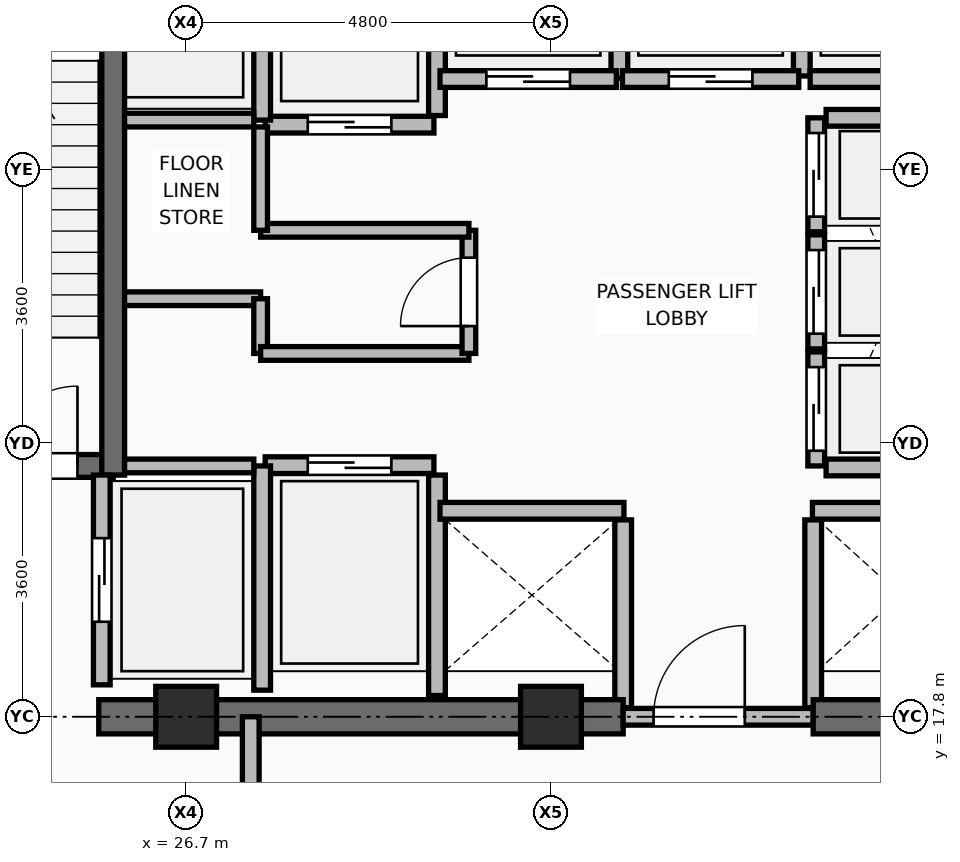
"""IFC4 building model, lengths in metres.
Left out: names, types, materials, properties, quantities, classifications, styles, units other than length and angle.
Written with IfcOpenShell. Run it as: python <this file> out.ifc"""

import sys

from ifc_helpers import new_model, si_unit, direction, frame, frame_2d, origin, origin_2d, place, context, subcontext, project, spatial, rectangle, extrude, element, fill, save


model = new_model("IFC4")
c1 = context("Model", 3, precision=1e-05, world=origin(), true_north=direction((0.0, 1.0)))
c2 = subcontext(c1, "Body", "Model", "MODEL_VIEW")
j1 = project(units=[si_unit("LENGTHUNIT", "METRE"), si_unit("PLANEANGLEUNIT", "RADIAN")], contexts=[c1])
p1 = place(None, origin())
s1 = spatial("IfcSite", under=j1, at=p1, CompositionType="ELEMENT")
p2 = place(p1, origin())
s2 = spatial("IfcBuilding", under=s1, at=p2, CompositionType="ELEMENT")
p3 = place(p2, frame((0.0, 0.0, 181.35)))
s3 = spatial("IfcBuildingStorey", under=s2, at=p3, CompositionType="ELEMENT", Elevation=181.35)
for number, where, z_axis, x_axis in (
    (1, (26.7, 17.8, 0.0), (0.0, 0.0, 1.0), (1.0, 0.0, 0.0)),
    (2, (31.5, 17.8, 0.0), (0.0, 0.0, 1.0), (1.0, 0.0, 0.0)),
):
    element("IfcColumn", number, at=place(p3, frame(where, z_axis=z_axis, x_axis=x_axis)), inside=s3, PredefinedType="COLUMN", context=c2, shape_type="SweptSolid", body=[
        extrude(rectangle(XDim=0.8, YDim=0.8, at=origin_2d()), origin(), (0.0, 0.0, 1.0), 4.8),
    ])
p4 = place(p3, frame((30.0, 18.08, 0.0), z_axis=(0.0, 0.0, 1.0), x_axis=(0.0, 1.0, 0.0)))
e3 = element("IfcWall", 3, at=p4, inside=s3, PredefinedType="PARTITIONING", context=c2, shape_type="SweptSolid", body=[
    extrude(rectangle(XDim=2.9, YDim=0.22, at=frame_2d((1.45, 0.0))), origin(), (0.0, 0.0, 1.0), 4.595),
])
for number, where, z_axis, x_axis in (
    (4, (32.45, 17.92, 0.0), (0.0, 0.0, 1.0), (0.0, 1.0, 0.0)),
    (5, (34.95, 17.92, 0.0), (0.0, 0.0, 1.0), (0.0, 1.0, 0.0)),
):
    element("IfcWall", number, at=place(p3, frame(where, z_axis=z_axis, x_axis=x_axis)), inside=s3, PredefinedType="PARTITIONING", context=c2, shape_type="SweptSolid", body=[
        extrude(rectangle(XDim=2.47, YDim=0.22, at=frame_2d((1.235, 0.0))), origin(), (0.0, 0.0, 1.0), 4.595),
    ])
p5 = place(p3, frame((30.0, 25.71, 0.0), z_axis=(0.0, 0.0, 1.0), x_axis=(0.0, 1.0, 0.0)))
e6 = element("IfcWall", 6, at=p5, inside=s3, PredefinedType="PARTITIONING", context=c2, shape_type="SweptSolid", body=[
    extrude(rectangle(XDim=2.73, YDim=0.22, at=frame_2d((1.365, 0.0))), origin(), (0.0, 0.0, 1.0), 4.595),
])
p6 = place(p3, frame((32.4, 26.2, 0.0), z_axis=(0.0, 0.0, 1.0), x_axis=(0.0, 1.0, 0.0)))
e7 = element("IfcWall", 7, at=p6, inside=s3, PredefinedType="PARTITIONING", context=c2, shape_type="SweptSolid", body=[
    extrude(rectangle(XDim=2.24, YDim=0.22, at=frame_2d((1.12, 0.0))), origin(), (0.0, 0.0, 1.0), 4.595),
])
p7 = place(p3, frame((34.8, 26.23, 0.0), z_axis=(0.0, 0.0, 1.0), x_axis=(0.0, 1.0, 0.0)))
e8 = element("IfcWall", 8, at=p7, inside=s3, PredefinedType="PARTITIONING", context=c2, shape_type="SweptSolid", body=[
    extrude(rectangle(XDim=2.21, YDim=0.22, at=frame_2d((1.105, 0.0))), origin(), (0.0, 0.0, 1.0), 4.595),
])
p8 = place(p3, frame((34.91, 26.19, 0.0), z_axis=(0.0, 0.0, 1.0), x_axis=(1.0, 0.0, 0.0)))
e9 = element("IfcWall", 9, at=p8, inside=s3, PredefinedType="PARTITIONING", context=c2, shape_type="SweptSolid", body=[
    extrude(rectangle(XDim=2.14, YDim=0.22, at=frame_2d((1.07, 0.0))), origin(), (0.0, 0.0, 1.0), 4.595),
])
p9 = place(p3, frame((25.55, 17.8, 0.0), z_axis=(0.0, 0.0, 1.0), x_axis=(1.0, 0.0, 0.0)))
e10 = element("IfcWall", 10, at=p9, inside=s3, PredefinedType="SHEAR", context=c2, shape_type="SweptSolid", body=[
    extrude(rectangle(XDim=6.9, YDim=0.45, at=frame_2d((3.45, 0.0))), origin(), (0.0, 0.0, 1.0), 4.62),
])
p10 = place(p3, frame((32.45, 17.8, 0.0), z_axis=(0.0, 0.0, 1.0), x_axis=(1.0, 0.0, 0.0)))
e11 = element("IfcWall", 11, at=p10, inside=s3, PredefinedType="PARTITIONING", context=c2, shape_type="SweptSolid", body=[
    extrude(rectangle(XDim=2.5, YDim=0.22, at=frame_2d((1.25, 0.0))), origin(), (0.0, 0.0, 1.0), 4.131),
])
p11 = place(p10, frame((0.4, 0.0, 0.0)))
e12 = element("IfcOpeningElement", 12, at=p11, cuts=e11, PredefinedType="OPENING", context=c2, shape_type="SweptSolid", body=[
    extrude(rectangle(XDim=1.2, YDim=2.1, at=frame_2d((0.6, 1.05))), frame((0.0, 0.12, 0.0), z_axis=(0.0, -1.0, 0.0), x_axis=(1.0, 0.0, 0.0)), (0.0, 0.0, 1.0), 0.24),
])
p12 = place(p3, frame((34.95, 17.8, 0.0), z_axis=(0.0, 0.0, 1.0), x_axis=(1.0, 0.0, 0.0)))
e13 = element("IfcWall", 13, at=p12, inside=s3, PredefinedType="SHEAR", context=c2, shape_type="SweptSolid", body=[
    extrude(rectangle(XDim=6.375, YDim=0.45, at=frame_2d((3.188, 0.0))), origin(), (0.0, 0.0, 1.0), 4.62),
])
p13 = place(p3, frame((22.125, 21.1, 0.0), z_axis=(0.0, 0.0, 1.0), x_axis=(1.0, 0.0, 0.0)))
e14 = element("IfcWall", 14, at=p13, inside=s3, PredefinedType="SHEAR", context=c2, shape_type="SweptSolid", body=[
    extrude(rectangle(XDim=3.615, YDim=0.3, at=frame_2d((1.808, 0.0))), origin(), (0.0, 0.0, 1.0), 4.62),
])
p14 = place(p13, frame((2.095, 0.0, 0.0)))
e15 = element("IfcOpeningElement", 15, at=p14, cuts=e14, PredefinedType="OPENING", context=c2, shape_type="SweptSolid", body=[
    extrude(rectangle(XDim=1.05, YDim=2.1, at=frame_2d((0.525, 1.05))), frame((0.0, 0.16, 0.0), z_axis=(0.0, -1.0, 0.0), x_axis=(1.0, 0.0, 0.0)), (0.0, 0.0, 1.0), 0.32),
])
p15 = place(p3, frame((25.74, 20.98, 0.0), z_axis=(0.0, 0.0, 1.0), x_axis=(0.0, 1.0, 0.0)))
e16 = element("IfcWall", 16, at=p15, inside=s3, PredefinedType="SHEAR", context=c2, shape_type="SweptSolid", body=[
    extrude(rectangle(XDim=7.99, YDim=0.3, at=frame_2d((3.995, 0.0))), origin(), (0.0, 0.0, 1.0), 4.62),
])
p16 = place(p3, frame((25.59, 18.22, 0.0), z_axis=(0.0, 0.0, 1.0), x_axis=(0.0, 1.0, 0.0)))
e17 = element("IfcWall", 17, at=p16, inside=s3, PredefinedType="PARTITIONING", context=c2, shape_type="SweptSolid", body=[
    extrude(rectangle(XDim=2.76, YDim=0.22, at=frame_2d((1.38, 0.0))), origin(), (0.0, 0.0, 1.0), 4.6),
])
p17 = place(p16, frame((0.83, 0.0, 0.0)))
e18 = element("IfcOpeningElement", 18, at=p17, cuts=e17, PredefinedType="OPENING", context=c2, shape_type="SweptSolid", body=[
    extrude(rectangle(XDim=1.1, YDim=2.2, at=frame_2d((0.55, 1.1))), frame((0.0, 0.12, 0.0), z_axis=(0.0, -1.0, 0.0), x_axis=(1.0, 0.0, 0.0)), (0.0, 0.0, 1.0), 0.24),
])
p18 = place(p3, frame((27.74, 21.11, 0.0), z_axis=(0.0, 0.0, 1.0), x_axis=(1.0, 0.0, 0.0)))
e19 = element("IfcWall", 19, at=p18, inside=s3, PredefinedType="PARTITIONING", context=c2, shape_type="SweptSolid", body=[
    extrude(rectangle(XDim=2.22, YDim=0.22, at=frame_2d((1.11, 0.0))), origin(), (0.0, 0.0, 1.0), 4.6),
])
p19 = place(p18, frame((0.56, 0.0, 0.0)))
e20 = element("IfcOpeningElement", 20, at=p19, cuts=e19, PredefinedType="OPENING", context=c2, shape_type="SweptSolid", body=[
    extrude(rectangle(XDim=1.1, YDim=2.2, at=frame_2d((0.55, 1.1))), frame((0.0, 0.12, 0.0), z_axis=(0.0, -1.0, 0.0), x_axis=(1.0, 0.0, 0.0)), (0.0, 0.0, 1.0), 0.24),
])
p20 = place(p3, frame((27.74, 25.59, 0.0), z_axis=(0.0, 0.0, 1.0), x_axis=(1.0, 0.0, 0.0)))
e21 = element("IfcWall", 21, at=p20, inside=s3, PredefinedType="PARTITIONING", context=c2, shape_type="SweptSolid", body=[
    extrude(rectangle(XDim=2.22, YDim=0.22, at=frame_2d((1.11, 0.0))), origin(), (0.0, 0.0, 1.0), 4.6),
])
p21 = place(p20, frame((0.56, 0.0, 0.0)))
e22 = element("IfcOpeningElement", 22, at=p21, cuts=e21, PredefinedType="OPENING", context=c2, shape_type="SweptSolid", body=[
    extrude(rectangle(XDim=1.1, YDim=2.2, at=frame_2d((0.55, 1.1))), frame((0.0, 0.12, 0.0), z_axis=(0.0, -1.0, 0.0), x_axis=(1.0, 0.0, 0.0)), (0.0, 0.0, 1.0), 0.24),
])
p22 = place(p3, frame((30.04, 20.51, 0.0), z_axis=(0.0, 0.0, 1.0), x_axis=(1.0, 0.0, 0.0)))
e23 = element("IfcWall", 23, at=p22, inside=s3, PredefinedType="PARTITIONING", context=c2, shape_type="SweptSolid", body=[
    extrude(rectangle(XDim=2.42, YDim=0.22, at=frame_2d((1.21, 0.0))), origin(), (0.0, 0.0, 1.0), 4.6),
])
p23 = place(p3, frame((34.94, 20.51, 0.0), z_axis=(0.0, 0.0, 1.0), x_axis=(1.0, 0.0, 0.0)))
e24 = element("IfcWall", 24, at=p23, inside=s3, PredefinedType="PARTITIONING", context=c2, shape_type="SweptSolid", body=[
    extrude(rectangle(XDim=2.24, YDim=0.22, at=frame_2d((1.12, 0.0))), origin(), (0.0, 0.0, 1.0), 4.6),
])
p24 = place(p3, frame((30.04, 26.19, 0.0), z_axis=(0.0, 0.0, 1.0), x_axis=(1.0, 0.0, 0.0)))
e25 = element("IfcWall", 25, at=p24, inside=s3, PredefinedType="PARTITIONING", context=c2, shape_type="SweptSolid", body=[
    extrude(rectangle(XDim=2.32, YDim=0.22, at=frame_2d((1.16, 0.0))), origin(), (0.0, 0.0, 1.0), 4.6),
])
p25 = place(p24, frame((0.61, 0.0, 0.0)))
e26 = element("IfcOpeningElement", 26, at=p25, cuts=e25, PredefinedType="OPENING", context=c2, shape_type="SweptSolid", body=[
    extrude(rectangle(XDim=1.1, YDim=2.2, at=frame_2d((0.55, 1.1))), frame((0.0, 0.12, 0.0), z_axis=(0.0, -1.0, 0.0), x_axis=(1.0, 0.0, 0.0)), (0.0, 0.0, 1.0), 0.24),
])
p26 = place(p3, frame((32.44, 26.19, 0.0), z_axis=(0.0, 0.0, 1.0), x_axis=(1.0, 0.0, 0.0)))
e27 = element("IfcWall", 27, at=p26, inside=s3, PredefinedType="PARTITIONING", context=c2, shape_type="SweptSolid", body=[
    extrude(rectangle(XDim=2.32, YDim=0.22, at=frame_2d((1.16, 0.0))), origin(), (0.0, 0.0, 1.0), 4.6),
])
p27 = place(p26, frame((0.61, 0.0, 0.0)))
e28 = element("IfcOpeningElement", 28, at=p27, cuts=e27, PredefinedType="OPENING", context=c2, shape_type="SweptSolid", body=[
    extrude(rectangle(XDim=1.1, YDim=2.2, at=frame_2d((0.55, 1.1))), frame((0.0, 0.12, 0.0), z_axis=(0.0, -1.0, 0.0), x_axis=(1.0, 0.0, 0.0)), (0.0, 0.0, 1.0), 0.24),
])
p28 = place(p3, frame((34.99, 21.1, 0.0), z_axis=(0.0, 0.0, 1.0), x_axis=(0.0, 1.0, 0.0)))
e29 = element("IfcWall", 29, at=p28, inside=s3, PredefinedType="PARTITIONING", context=c2, shape_type="SweptSolid", body=[
    extrude(rectangle(XDim=1.5, YDim=0.22, at=frame_2d((0.75, 0.0))), origin(), (0.0, 0.0, 1.0), 4.6),
])
p29 = place(p28, frame((0.2, 0.0, 0.0)))
e30 = element("IfcOpeningElement", 30, at=p29, cuts=e29, PredefinedType="OPENING", context=c2, shape_type="SweptSolid", body=[
    extrude(rectangle(XDim=1.1, YDim=2.2, at=frame_2d((0.55, 1.1))), frame((0.0, 0.12, 0.0), z_axis=(0.0, -1.0, 0.0), x_axis=(1.0, 0.0, 0.0)), (0.0, 0.0, 1.0), 0.24),
])
p30 = place(p3, frame((34.99, 22.64, 0.0), z_axis=(0.0, 0.0, 1.0), x_axis=(0.0, 1.0, 0.0)))
e31 = element("IfcWall", 31, at=p30, inside=s3, PredefinedType="PARTITIONING", context=c2, shape_type="SweptSolid", body=[
    extrude(rectangle(XDim=1.5, YDim=0.22, at=frame_2d((0.75, 0.0))), origin(), (0.0, 0.0, 1.0), 4.6),
])
p31 = place(p30, frame((0.2, 0.0, 0.0)))
e32 = element("IfcOpeningElement", 32, at=p31, cuts=e31, PredefinedType="OPENING", context=c2, shape_type="SweptSolid", body=[
    extrude(rectangle(XDim=1.1, YDim=2.2, at=frame_2d((0.55, 1.1))), frame((0.0, 0.12, 0.0), z_axis=(0.0, -1.0, 0.0), x_axis=(1.0, 0.0, 0.0)), (0.0, 0.0, 1.0), 0.24),
])
p32 = place(p3, frame((34.99, 24.18, 0.0), z_axis=(0.0, 0.0, 1.0), x_axis=(0.0, 1.0, 0.0)))
e33 = element("IfcWall", 33, at=p32, inside=s3, PredefinedType="PARTITIONING", context=c2, shape_type="SweptSolid", body=[
    extrude(rectangle(XDim=1.5, YDim=0.22, at=frame_2d((0.75, 0.0))), origin(), (0.0, 0.0, 1.0), 4.6),
])
p33 = place(p32, frame((0.2, 0.0, 0.0)))
e34 = element("IfcOpeningElement", 34, at=p33, cuts=e33, PredefinedType="OPENING", context=c2, shape_type="SweptSolid", body=[
    extrude(rectangle(XDim=1.1, YDim=2.2, at=frame_2d((0.55, 1.1))), frame((0.0, 0.12, 0.0), z_axis=(0.0, -1.0, 0.0), x_axis=(1.0, 0.0, 0.0)), (0.0, 0.0, 1.0), 0.24),
])
p34 = place(p3, frame((27.7, 18.15, 0.0), z_axis=(0.0, 0.0, 1.0), x_axis=(0.0, 1.0, 0.0)))
e35 = element("IfcWall", 35, at=p34, inside=s3, PredefinedType="PARTITIONING", context=c2, shape_type="SweptSolid", body=[
    extrude(rectangle(XDim=2.95, YDim=0.22, at=frame_2d((1.475, 0.0))), origin(), (0.0, 0.0, 1.0), 4.6),
])
p35 = place(p3, frame((27.7, 25.65, 0.0), z_axis=(0.0, 0.0, 1.0), x_axis=(0.0, 1.0, 0.0)))
e36 = element("IfcWall", 36, at=p35, inside=s3, PredefinedType="PARTITIONING", context=c2, shape_type="SweptSolid", body=[
    extrude(rectangle(XDim=3.0, YDim=0.22, at=frame_2d((1.5, 0.0))), origin(), (0.0, 0.0, 1.0), 4.6),
])
for number, where, z_axis, x_axis in (
    (37, (35.12, 21.08, 0.0), (0.0, 0.0, 1.0), (1.0, 0.0, 0.0)),
    (38, (35.12, 25.68, 0.0), (0.0, 0.0, 1.0), (1.0, 0.0, 0.0)),
):
    element("IfcWall", number, at=place(p3, frame(where, z_axis=z_axis, x_axis=x_axis)), inside=s3, PredefinedType="PARTITIONING", context=c2, shape_type="SweptSolid", body=[
        extrude(rectangle(XDim=1.94, YDim=0.22, at=frame_2d((0.97, 0.0))), origin(), (0.0, 0.0, 1.0), 4.6),
    ])
for number, where, z_axis, x_axis in (
    (39, (25.89, 21.1, 0.0), (0.0, 0.0, 1.0), (1.0, 0.0, 0.0)),
    (40, (25.89, 25.65, 0.0), (0.0, 0.0, 1.0), (1.0, 0.0, 0.0)),
):
    element("IfcWall", number, at=place(p3, frame(where, z_axis=z_axis, x_axis=x_axis)), inside=s3, PredefinedType="PARTITIONING", context=c2, shape_type="SweptSolid", body=[
        extrude(rectangle(XDim=1.7, YDim=0.18, at=frame_2d((0.85, 0.0))), origin(), (0.0, 0.0, 1.0), 4.6),
    ])
p36 = place(p3, frame((25.89, 23.3, 0.0), z_axis=(0.0, 0.0, 1.0), x_axis=(1.0, 0.0, 0.0)))
e41 = element("IfcWall", 41, at=p36, inside=s3, PredefinedType="PARTITIONING", context=c2, shape_type="SweptSolid", body=[
    extrude(rectangle(XDim=1.79, YDim=0.18, at=frame_2d((0.895, 0.0))), origin(), (0.0, 0.0, 1.0), 4.6),
])
p37 = place(p3, frame((27.68, 22.58, 0.0), z_axis=(0.0, 0.0, 1.0), x_axis=(0.0, 1.0, 0.0)))
e42 = element("IfcWall", 42, at=p37, inside=s3, PredefinedType="PARTITIONING", context=c2, shape_type="SweptSolid", body=[
    extrude(rectangle(XDim=0.72, YDim=0.18, at=frame_2d((0.36, 0.0))), origin(), (0.0, 0.0, 1.0), 4.6),
])
p38 = place(p3, frame((27.68, 22.58, 0.0), z_axis=(0.0, 0.0, 1.0), x_axis=(1.0, 0.0, 0.0)))
e43 = element("IfcWall", 43, at=p38, inside=s3, PredefinedType="PARTITIONING", context=c2, shape_type="SweptSolid", body=[
    extrude(rectangle(XDim=2.74, YDim=0.18, at=frame_2d((1.37, 0.0))), origin(), (0.0, 0.0, 1.0), 4.6),
])
p39 = place(p3, frame((30.42, 22.58, 0.0), z_axis=(0.0, 0.0, 1.0), x_axis=(0.0, 1.0, 0.0)))
e44 = element("IfcWall", 44, at=p39, inside=s3, PredefinedType="PARTITIONING", context=c2, shape_type="SweptSolid", body=[
    extrude(rectangle(XDim=1.62, YDim=0.18, at=frame_2d((0.81, 0.0))), origin(), (0.0, 0.0, 1.0), 4.6),
])
p40 = place(p39, frame((0.36, 0.0, 0.0)))
e45 = element("IfcOpeningElement", 45, at=p40, cuts=e44, PredefinedType="OPENING", context=c2, shape_type="SweptSolid", body=[
    extrude(rectangle(XDim=0.9, YDim=2.1, at=frame_2d((0.45, 1.05))), frame((0.0, 0.1, 0.0), z_axis=(0.0, -1.0, 0.0), x_axis=(1.0, 0.0, 0.0)), (0.0, 0.0, 1.0), 0.2),
])
p41 = place(p3, frame((27.68, 24.2, 0.0), z_axis=(0.0, 0.0, 1.0), x_axis=(1.0, 0.0, 0.0)))
e46 = element("IfcWall", 46, at=p41, inside=s3, PredefinedType="PARTITIONING", context=c2, shape_type="SweptSolid", body=[
    extrude(rectangle(XDim=2.74, YDim=0.18, at=frame_2d((1.37, 0.0))), origin(), (0.0, 0.0, 1.0), 4.6),
])
p42 = place(p3, frame((27.68, 24.2, 0.0), z_axis=(0.0, 0.0, 1.0), x_axis=(0.0, 1.0, 0.0)))
e47 = element("IfcWall", 47, at=p42, inside=s3, PredefinedType="PARTITIONING", context=c2, shape_type="SweptSolid", body=[
    extrude(rectangle(XDim=1.36, YDim=0.18, at=frame_2d((0.68, 0.0))), origin(), (0.0, 0.0, 1.0), 4.6),
])
p43 = place(p3, frame((27.55, 14.35, 0.0), z_axis=(0.0, 0.0, 1.0), x_axis=(0.0, 1.0, 0.0)))
e48 = element("IfcWall", 48, at=p43, inside=s3, PredefinedType="PARTITIONING", context=c2, shape_type="SweptSolid", body=[
    extrude(rectangle(XDim=3.45, YDim=0.22, at=frame_2d((1.725, 0.0))), origin(), (0.0, 0.0, 1.0), 4.131),
])
p44 = place(p43, frame((1.175, 0.0, 0.0)))
e49 = element("IfcOpeningElement", 49, at=p44, cuts=e48, PredefinedType="OPENING", context=c2, shape_type="SweptSolid", body=[
    extrude(rectangle(XDim=1.1, YDim=2.1, at=frame_2d((0.55, 1.05))), frame((0.0, 0.12, 0.0), z_axis=(0.0, -1.0, 0.0), x_axis=(1.0, 0.0, 0.0)), (0.0, 0.0, 1.0), 0.24),
])
p45 = place(p11, origin())
e50 = element("IfcDoor", 50, at=p45, inside=s3, OperationType="SINGLE_SWING_RIGHT", PredefinedType="DOOR", context=c2, shape_type="SweptSolid", body=[
    extrude(rectangle(XDim=1.2, YDim=2.1, at=frame_2d((0.6, 1.05))), frame((0.0, 0.025, 0.0), z_axis=(0.0, -1.0, 0.0), x_axis=(1.0, 0.0, 0.0)), (0.0, 0.0, 1.0), 0.05),
])
fill(e12, e50)
p46 = place(p14, origin())
e51 = element("IfcDoor", 51, at=p46, inside=s3, OperationType="SINGLE_SWING_RIGHT", PredefinedType="DOOR", context=c2, shape_type="SweptSolid", body=[
    extrude(rectangle(XDim=1.05, YDim=2.1, at=frame_2d((0.525, 1.05))), frame((0.0, 0.025, 0.0), z_axis=(0.0, -1.0, 0.0), x_axis=(1.0, 0.0, 0.0)), (0.0, 0.0, 1.0), 0.05),
])
fill(e15, e51)
p47 = place(p17, origin())
e52 = element("IfcDoor", 52, at=p47, inside=s3, OperationType="DOUBLE_DOOR_SLIDING", PredefinedType="DOOR", context=c2, shape_type="SweptSolid", body=[
    extrude(rectangle(XDim=1.1, YDim=2.2, at=frame_2d((0.55, 1.1))), frame((0.0, 0.025, 0.0), z_axis=(0.0, -1.0, 0.0), x_axis=(1.0, 0.0, 0.0)), (0.0, 0.0, 1.0), 0.05),
])
fill(e18, e52)
p48 = place(p19, origin())
e53 = element("IfcDoor", 53, at=p48, inside=s3, OperationType="DOUBLE_DOOR_SLIDING", PredefinedType="DOOR", context=c2, shape_type="SweptSolid", body=[
    extrude(rectangle(XDim=1.1, YDim=2.2, at=frame_2d((0.55, 1.1))), frame((0.0, 0.025, 0.0), z_axis=(0.0, -1.0, 0.0), x_axis=(1.0, 0.0, 0.0)), (0.0, 0.0, 1.0), 0.05),
])
fill(e20, e53)
p49 = place(p21, frame((1.1, 0.0, 0.0), z_axis=(0.0, 0.0, 1.0), x_axis=(-1.0, 0.0, 0.0)))
e54 = element("IfcDoor", 54, at=p49, inside=s3, OperationType="DOUBLE_DOOR_SLIDING", PredefinedType="DOOR", context=c2, shape_type="SweptSolid", body=[
    extrude(rectangle(XDim=1.1, YDim=2.2, at=frame_2d((0.55, 1.1))), frame((0.0, 0.025, 0.0), z_axis=(0.0, -1.0, 0.0), x_axis=(1.0, 0.0, 0.0)), (0.0, 0.0, 1.0), 0.05),
])
fill(e22, e54)
p50 = place(p25, frame((1.1, 0.0, 0.0), z_axis=(0.0, 0.0, 1.0), x_axis=(-1.0, 0.0, 0.0)))
e55 = element("IfcDoor", 55, at=p50, inside=s3, OperationType="DOUBLE_DOOR_SLIDING", PredefinedType="DOOR", context=c2, shape_type="SweptSolid", body=[
    extrude(rectangle(XDim=1.1, YDim=2.2, at=frame_2d((0.55, 1.1))), frame((0.0, 0.025, 0.0), z_axis=(0.0, -1.0, 0.0), x_axis=(1.0, 0.0, 0.0)), (0.0, 0.0, 1.0), 0.05),
])
fill(e26, e55)
p51 = place(p27, frame((1.1, 0.0, 0.0), z_axis=(0.0, 0.0, 1.0), x_axis=(-1.0, 0.0, 0.0)))
e56 = element("IfcDoor", 56, at=p51, inside=s3, OperationType="DOUBLE_DOOR_SLIDING", PredefinedType="DOOR", context=c2, shape_type="SweptSolid", body=[
    extrude(rectangle(XDim=1.1, YDim=2.2, at=frame_2d((0.55, 1.1))), frame((0.0, 0.025, 0.0), z_axis=(0.0, -1.0, 0.0), x_axis=(1.0, 0.0, 0.0)), (0.0, 0.0, 1.0), 0.05),
])
fill(e28, e56)
p52 = place(p29, origin())
e57 = element("IfcDoor", 57, at=p52, inside=s3, OperationType="DOUBLE_DOOR_SLIDING", PredefinedType="DOOR", context=c2, shape_type="SweptSolid", body=[
    extrude(rectangle(XDim=1.1, YDim=2.2, at=frame_2d((0.55, 1.1))), frame((0.0, 0.025, 0.0), z_axis=(0.0, -1.0, 0.0), x_axis=(1.0, 0.0, 0.0)), (0.0, 0.0, 1.0), 0.05),
])
fill(e30, e57)
p53 = place(p31, origin())
e58 = element("IfcDoor", 58, at=p53, inside=s3, OperationType="DOUBLE_DOOR_SLIDING", PredefinedType="DOOR", context=c2, shape_type="SweptSolid", body=[
    extrude(rectangle(XDim=1.1, YDim=2.2, at=frame_2d((0.55, 1.1))), frame((0.0, 0.025, 0.0), z_axis=(0.0, -1.0, 0.0), x_axis=(1.0, 0.0, 0.0)), (0.0, 0.0, 1.0), 0.05),
])
fill(e32, e58)
p54 = place(p33, origin())
e59 = element("IfcDoor", 59, at=p54, inside=s3, OperationType="DOUBLE_DOOR_SLIDING", PredefinedType="DOOR", context=c2, shape_type="SweptSolid", body=[
    extrude(rectangle(XDim=1.1, YDim=2.2, at=frame_2d((0.55, 1.1))), frame((0.0, 0.025, 0.0), z_axis=(0.0, -1.0, 0.0), x_axis=(1.0, 0.0, 0.0)), (0.0, 0.0, 1.0), 0.05),
])
fill(e34, e59)
p55 = place(p40, origin())
e60 = element("IfcDoor", 60, at=p55, inside=s3, OperationType="SINGLE_SWING_LEFT", PredefinedType="DOOR", context=c2, shape_type="SweptSolid", body=[
    extrude(rectangle(XDim=0.9, YDim=2.1, at=frame_2d((0.45, 1.05))), frame((0.0, 0.025, 0.0), z_axis=(0.0, -1.0, 0.0), x_axis=(1.0, 0.0, 0.0)), (0.0, 0.0, 1.0), 0.05),
])
fill(e45, e60)
save(model, sys.argv[1])
